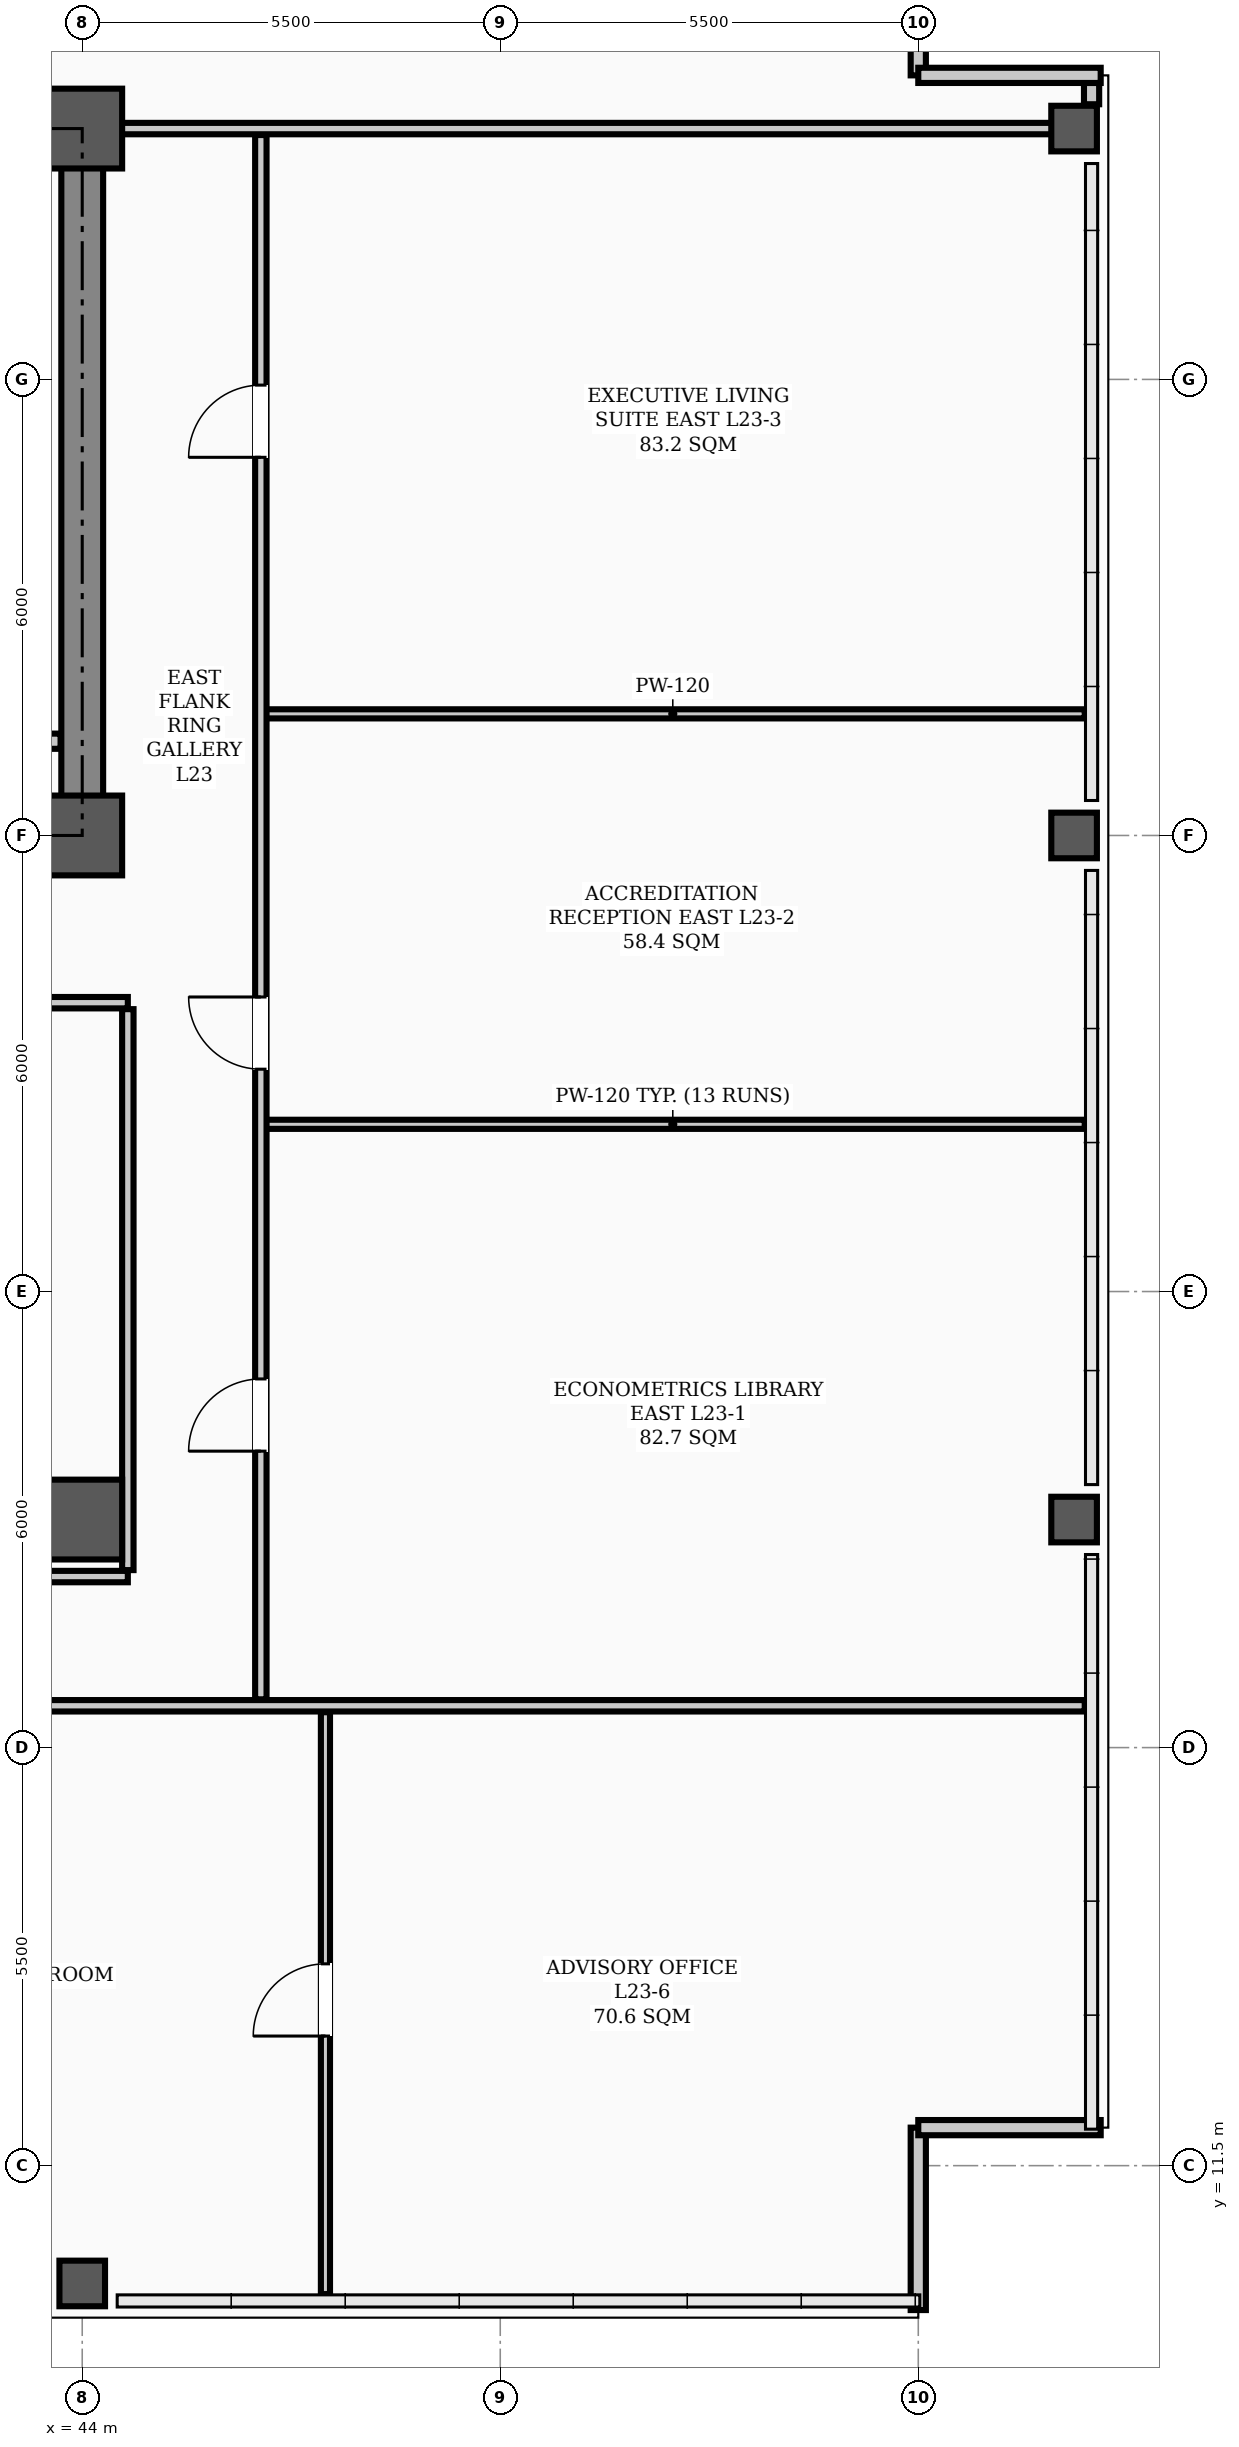
"""IFC4 building model, lengths in metres.
Left out: names, types, materials, properties, quantities, classifications, styles, units other than length and angle.
Written with IfcOpenShell. Run it as: python <this file> out.ifc"""

import sys

from ifc_helpers import new_model, si_unit, direction, frame, frame_2d, origin, origin_2d, place, context, subcontext, project, spatial, rectangle, hollow_rectangle, extrude, element, fill, save


model = new_model("IFC4")
c1 = context("Model", 3, precision=1e-05, world=origin(), true_north=direction((0.0, 1.0)))
c2 = subcontext(c1, "Body", "Model", "MODEL_VIEW")
j1 = project(units=[si_unit("LENGTHUNIT", "METRE"), si_unit("PLANEANGLEUNIT", "RADIAN")], contexts=[c1])
p1 = place(None, origin())
s1 = spatial("IfcSite", under=j1, at=p1, CompositionType="ELEMENT")
p2 = place(p1, origin())
s2 = spatial("IfcBuilding", under=s1, at=p2, CompositionType="ELEMENT")
p3 = place(p2, frame((0.0, 0.0, 92.8)))
s3 = spatial("IfcBuildingStorey", under=s2, at=p3, CompositionType="ELEMENT", Elevation=92.8)
for number, where, z_axis, x_axis in (
    (1, (44.0, 29.0, 0.0), (0.0, 0.0, 1.0), (1.0, 0.0, 0.0)),
    (2, (44.0, 38.3, 0.0), (0.0, 0.0, 1.0), (1.0, 0.0, 0.0)),
    (3, (44.0, 20.0, 0.0), (0.0, 0.0, 1.0), (1.0, 0.0, 0.0)),
):
    element("IfcColumn", number, at=place(p3, frame(where, z_axis=z_axis, x_axis=x_axis)), inside=s3, PredefinedType="COLUMN", context=c2, shape_type="SweptSolid", body=[
        extrude(hollow_rectangle(XDim=1.05, YDim=1.05, WallThickness=0.038, InnerFilletRadius=0.019, OuterFilletRadius=0.057, at=origin_2d()), origin(), (0.0, 0.0, 1.0), 3.9),
    ])
for number, where, z_axis, x_axis in (
    (4, (44.0, 9.95, 0.0), (0.0, 0.0, 1.0), (1.0, 0.0, 0.0)),
    (5, (57.05, 20.0, 0.0), (0.0, 0.0, 1.0), (1.0, 0.0, 0.0)),
    (6, (57.05, 29.0, 0.0), (0.0, 0.0, 1.0), (1.0, 0.0, 0.0)),
    (7, (57.05, 38.3, 0.0), (0.0, 0.0, 1.0), (1.0, 0.0, 0.0)),
):
    element("IfcColumn", number, at=place(p3, frame(where, z_axis=z_axis, x_axis=x_axis)), inside=s3, PredefinedType="COLUMN", context=c2, shape_type="SweptSolid", body=[
        extrude(hollow_rectangle(XDim=0.6, YDim=0.6, WallThickness=0.026, InnerFilletRadius=0.013, OuterFilletRadius=0.039, at=origin_2d()), origin(), (0.0, 0.0, 1.0), 3.9),
    ])
p4 = place(p3, frame((57.28, 38.62, 0.0), z_axis=(0.0, 0.0, 1.0), x_axis=(0.0, 1.0, 0.0)))
e8 = element("IfcWall", 8, at=p4, inside=s3, PredefinedType="PARAPET", context=c2, shape_type="SweptSolid", body=[
    extrude(rectangle(XDim=0.28, YDim=0.2, at=frame_2d((0.14, 0.0))), origin(), (0.0, 0.0, 1.0), 1.2),
])
for number, where, z_axis, x_axis in (
    (9, (55.0, 9.6, 0.0), (0.0, 0.0, 1.0), (0.0, 1.0, 0.0)),
    (10, (55.0, 12.0, 0.0), (0.0, 0.0, 1.0), (1.0, 0.0, 0.0)),
    (11, (55.0, 41.4, 0.0), (0.0, 0.0, 1.0), (0.0, -1.0, 0.0)),
    (12, (55.0, 39.0, 0.0), (0.0, 0.0, 1.0), (1.0, 0.0, 0.0)),
):
    element("IfcWall", number, at=place(p3, frame(where, z_axis=z_axis, x_axis=x_axis)), inside=s3, PredefinedType="PARAPET", context=c2, shape_type="SweptSolid", body=[
        extrude(rectangle(XDim=2.4, YDim=0.2, at=frame_2d((1.2, 0.0))), origin(), (0.0, 0.0, 1.0), 1.2),
    ])
p5 = place(p3, frame((13.5, 29.0, 0.0), z_axis=(0.0, 0.0, 1.0), x_axis=(1.0, 0.0, 0.0)))
e13 = element("IfcWall", 13, at=p5, inside=s3, PredefinedType="SHEAR", context=c2, shape_type="SweptSolid", body=[
    extrude(rectangle(XDim=30.5, YDim=0.55, at=frame_2d((15.25, 0.0))), origin(), (0.0, 0.0, 1.0), 3.72),
])
p6 = place(p5, frame((1.75, 0.0, 0.0)))
e14 = element("IfcOpeningElement", 14, at=p6, cuts=e13, PredefinedType="OPENING", context=c2, shape_type="SweptSolid", body=[
    extrude(rectangle(XDim=1.1, YDim=2.08, at=frame_2d((0.55, 1.04))), frame((0.0, 0.285, 0.0), z_axis=(0.0, -1.0, 0.0), x_axis=(1.0, 0.0, 0.0)), (0.0, 0.0, 1.0), 0.57),
])
p7 = place(p5, frame((26.7, 0.0, 0.0)))
e15 = element("IfcOpeningElement", 15, at=p7, cuts=e13, PredefinedType="OPENING", context=c2, shape_type="SweptSolid", body=[
    extrude(rectangle(XDim=1.1, YDim=2.08, at=frame_2d((0.55, 1.04))), frame((0.0, 0.285, 0.0), z_axis=(0.0, -1.0, 0.0), x_axis=(1.0, 0.0, 0.0)), (0.0, 0.0, 1.0), 0.57),
])
p8 = place(p5, frame((6.8, 0.0, 0.0)))
e16 = element("IfcOpeningElement", 16, at=p8, cuts=e13, PredefinedType="OPENING", context=c2, shape_type="SweptSolid", body=[
    extrude(rectangle(XDim=1.1, YDim=2.08, at=frame_2d((0.55, 1.04))), frame((0.0, 0.285, 0.0), z_axis=(0.0, -1.0, 0.0), x_axis=(1.0, 0.0, 0.0)), (0.0, 0.0, 1.0), 0.57),
])
p9 = place(p5, frame((13.2, 0.0, 0.0)))
e17 = element("IfcOpeningElement", 17, at=p9, cuts=e13, PredefinedType="OPENING", context=c2, shape_type="SweptSolid", body=[
    extrude(rectangle(XDim=1.6, YDim=2.08, at=frame_2d((0.8, 1.04))), frame((0.0, 0.285, 0.0), z_axis=(0.0, -1.0, 0.0), x_axis=(1.0, 0.0, 0.0)), (0.0, 0.0, 1.0), 0.57),
])
p10 = place(p5, frame((19.6, 0.0, 0.0)))
e18 = element("IfcOpeningElement", 18, at=p10, cuts=e13, PredefinedType="OPENING", context=c2, shape_type="SweptSolid", body=[
    extrude(rectangle(XDim=0.9, YDim=2.08, at=frame_2d((0.45, 1.04))), frame((0.0, 0.285, 0.0), z_axis=(0.0, -1.0, 0.0), x_axis=(1.0, 0.0, 0.0)), (0.0, 0.0, 1.0), 0.57),
])
p11 = place(p5, frame((21.6, 0.0, 0.0)))
e19 = element("IfcOpeningElement", 19, at=p11, cuts=e13, PredefinedType="OPENING", context=c2, shape_type="SweptSolid", body=[
    extrude(rectangle(XDim=0.9, YDim=2.08, at=frame_2d((0.45, 1.04))), frame((0.0, 0.285, 0.0), z_axis=(0.0, -1.0, 0.0), x_axis=(1.0, 0.0, 0.0)), (0.0, 0.0, 1.0), 0.57),
])
p12 = place(p3, frame((13.5, 38.3, 0.0), z_axis=(0.0, 0.0, 1.0), x_axis=(1.0, 0.0, 0.0)))
e20 = element("IfcWall", 20, at=p12, inside=s3, PredefinedType="SHEAR", context=c2, shape_type="SweptSolid", body=[
    extrude(rectangle(XDim=30.5, YDim=0.55, at=frame_2d((15.25, 0.0))), origin(), (0.0, 0.0, 1.0), 3.72),
])
p13 = place(p3, frame((44.0, 29.35, 0.0), z_axis=(0.0, 0.0, 1.0), x_axis=(0.0, 1.0, 0.0)))
e21 = element("IfcWall", 21, at=p13, inside=s3, PredefinedType="SHEAR", context=c2, shape_type="SweptSolid", body=[
    extrude(rectangle(XDim=8.6, YDim=0.55, at=frame_2d((4.3, 0.0))), origin(), (0.0, 0.0, 1.0), 3.72),
])
p14 = place(p3, frame((42.4, 30.24, 0.0), z_axis=(0.0, 0.0, 1.0), x_axis=(1.0, 0.0, 0.0)))
e22 = element("IfcWall", 22, at=p14, inside=s3, PredefinedType="STANDARD", context=c2, shape_type="SweptSolid", body=[
    extrude(rectangle(XDim=1.315, YDim=0.2, at=frame_2d((0.658, 0.0))), origin(), (0.0, 0.0, 1.0), 3.1),
])
p15 = place(p3, frame((12.9, 26.8, 0.0), z_axis=(0.0, 0.0, 1.0), x_axis=(1.0, 0.0, 0.0)))
e23 = element("IfcWall", 23, at=p15, inside=s3, PredefinedType="PARTITIONING", context=c2, shape_type="SweptSolid", body=[
    extrude(rectangle(XDim=31.7, YDim=0.15, at=frame_2d((15.85, 0.0))), origin(), (0.0, 0.0, 1.0), 3.1),
])
p16 = place(p15, frame((13.6, 0.0, 0.0)))
e24 = element("IfcOpeningElement", 24, at=p16, cuts=e23, PredefinedType="OPENING", context=c2, shape_type="SweptSolid", body=[
    extrude(rectangle(XDim=1.6, YDim=2.08, at=frame_2d((0.8, 1.04))), frame((0.0, 0.085, 0.0), z_axis=(0.0, -1.0, 0.0), x_axis=(1.0, 0.0, 0.0)), (0.0, 0.0, 1.0), 0.17),
])
p17 = place(p15, frame((2.075, 0.0, 0.0)))
e25 = element("IfcOpeningElement", 25, at=p17, cuts=e23, PredefinedType="OPENING", context=c2, shape_type="SweptSolid", body=[
    extrude(rectangle(XDim=0.95, YDim=2.08, at=frame_2d((0.475, 1.04))), frame((0.0, 0.085, 0.0), z_axis=(0.0, -1.0, 0.0), x_axis=(1.0, 0.0, 0.0)), (0.0, 0.0, 1.0), 0.17),
])
p18 = place(p15, frame((6.925, 0.0, 0.0)))
e26 = element("IfcOpeningElement", 26, at=p18, cuts=e23, PredefinedType="OPENING", context=c2, shape_type="SweptSolid", body=[
    extrude(rectangle(XDim=0.95, YDim=2.08, at=frame_2d((0.475, 1.04))), frame((0.0, 0.085, 0.0), z_axis=(0.0, -1.0, 0.0), x_axis=(1.0, 0.0, 0.0)), (0.0, 0.0, 1.0), 0.17),
])
p19 = place(p15, frame((11.025, 0.0, 0.0)))
e27 = element("IfcOpeningElement", 27, at=p19, cuts=e23, PredefinedType="OPENING", context=c2, shape_type="SweptSolid", body=[
    extrude(rectangle(XDim=0.95, YDim=2.08, at=frame_2d((0.475, 1.04))), frame((0.0, 0.085, 0.0), z_axis=(0.0, -1.0, 0.0), x_axis=(1.0, 0.0, 0.0)), (0.0, 0.0, 1.0), 0.17),
])
p20 = place(p15, frame((16.075, 0.0, 0.0)))
e28 = element("IfcOpeningElement", 28, at=p20, cuts=e23, PredefinedType="OPENING", context=c2, shape_type="SweptSolid", body=[
    extrude(rectangle(XDim=0.95, YDim=2.08, at=frame_2d((0.475, 1.04))), frame((0.0, 0.085, 0.0), z_axis=(0.0, -1.0, 0.0), x_axis=(1.0, 0.0, 0.0)), (0.0, 0.0, 1.0), 0.17),
])
p21 = place(p15, frame((22.025, 0.0, 0.0)))
e29 = element("IfcOpeningElement", 29, at=p21, cuts=e23, PredefinedType="OPENING", context=c2, shape_type="SweptSolid", body=[
    extrude(rectangle(XDim=0.95, YDim=2.08, at=frame_2d((0.475, 1.04))), frame((0.0, 0.085, 0.0), z_axis=(0.0, -1.0, 0.0), x_axis=(1.0, 0.0, 0.0)), (0.0, 0.0, 1.0), 0.17),
])
p22 = place(p15, frame((28.525, 0.0, 0.0)))
e30 = element("IfcOpeningElement", 30, at=p22, cuts=e23, PredefinedType="OPENING", context=c2, shape_type="SweptSolid", body=[
    extrude(rectangle(XDim=0.95, YDim=2.08, at=frame_2d((0.475, 1.04))), frame((0.0, 0.085, 0.0), z_axis=(0.0, -1.0, 0.0), x_axis=(1.0, 0.0, 0.0)), (0.0, 0.0, 1.0), 0.17),
])
p23 = place(p3, frame((7.81, 17.55, 0.0), z_axis=(0.0, 0.0, 1.0), x_axis=(1.0, 0.0, 0.0)))
e31 = element("IfcWall", 31, at=p23, inside=s3, PredefinedType="PARTITIONING", context=c2, shape_type="SweptSolid", body=[
    extrude(rectangle(XDim=49.38, YDim=0.15, at=frame_2d((24.69, 0.0))), origin(), (0.0, 0.0, 1.0), 3.1),
])
p24 = place(p23, frame((3.59, 0.0, 0.0)))
e32 = element("IfcOpeningElement", 32, at=p24, cuts=e31, PredefinedType="OPENING", context=c2, shape_type="SweptSolid", body=[
    extrude(rectangle(XDim=0.95, YDim=2.08, at=frame_2d((0.475, 1.04))), frame((0.0, 0.085, 0.0), z_axis=(0.0, -1.0, 0.0), x_axis=(1.0, 0.0, 0.0)), (0.0, 0.0, 1.0), 0.17),
])
p25 = place(p23, frame((10.115, 0.0, 0.0)))
e33 = element("IfcOpeningElement", 33, at=p25, cuts=e31, PredefinedType="OPENING", context=c2, shape_type="SweptSolid", body=[
    extrude(rectangle(XDim=0.95, YDim=2.08, at=frame_2d((0.475, 1.04))), frame((0.0, 0.085, 0.0), z_axis=(0.0, -1.0, 0.0), x_axis=(1.0, 0.0, 0.0)), (0.0, 0.0, 1.0), 0.17),
])
p26 = place(p23, frame((18.615, 0.0, 0.0)))
e34 = element("IfcOpeningElement", 34, at=p26, cuts=e31, PredefinedType="OPENING", context=c2, shape_type="SweptSolid", body=[
    extrude(rectangle(XDim=0.95, YDim=2.08, at=frame_2d((0.475, 1.04))), frame((0.0, 0.085, 0.0), z_axis=(0.0, -1.0, 0.0), x_axis=(1.0, 0.0, 0.0)), (0.0, 0.0, 1.0), 0.17),
])
p27 = place(p23, frame((27.315, 0.0, 0.0)))
e35 = element("IfcOpeningElement", 35, at=p27, cuts=e31, PredefinedType="OPENING", context=c2, shape_type="SweptSolid", body=[
    extrude(rectangle(XDim=0.95, YDim=2.08, at=frame_2d((0.475, 1.04))), frame((0.0, 0.085, 0.0), z_axis=(0.0, -1.0, 0.0), x_axis=(1.0, 0.0, 0.0)), (0.0, 0.0, 1.0), 0.17),
])
p28 = place(p23, frame((33.89, 0.0, 0.0)))
e36 = element("IfcOpeningElement", 36, at=p28, cuts=e31, PredefinedType="OPENING", context=c2, shape_type="SweptSolid", body=[
    extrude(rectangle(XDim=0.95, YDim=2.08, at=frame_2d((0.475, 1.04))), frame((0.0, 0.085, 0.0), z_axis=(0.0, -1.0, 0.0), x_axis=(1.0, 0.0, 0.0)), (0.0, 0.0, 1.0), 0.17),
])
p29 = place(p3, frame((28.4, 19.25, 0.0), z_axis=(0.0, 0.0, 1.0), x_axis=(1.0, 0.0, 0.0)))
e37 = element("IfcWall", 37, at=p29, inside=s3, PredefinedType="PARTITIONING", context=c2, shape_type="SweptSolid", body=[
    extrude(rectangle(XDim=16.2, YDim=0.15, at=frame_2d((8.1, 0.0))), origin(), (0.0, 0.0, 1.0), 3.1),
])
p30 = place(p3, frame((44.0, 38.3, 0.0), z_axis=(0.0, 0.0, 1.0), x_axis=(1.0, 0.0, 0.0)))
e38 = element("IfcWall", 38, at=p30, inside=s3, PredefinedType="PARTITIONING", context=c2, shape_type="SweptSolid", body=[
    extrude(rectangle(XDim=13.19, YDim=0.15, at=frame_2d((6.595, 0.0))), origin(), (0.0, 0.0, 1.0), 3.0),
])
for number, where, z_axis, x_axis in (
    (39, (46.35, 25.2, 0.0), (0.0, 0.0, 1.0), (1.0, 0.0, 0.0)),
    (40, (46.35, 30.6, 0.0), (0.0, 0.0, 1.0), (1.0, 0.0, 0.0)),
):
    element("IfcWall", number, at=place(p3, frame(where, z_axis=z_axis, x_axis=x_axis)), inside=s3, PredefinedType="PARTITIONING", context=c2, shape_type="SweptSolid", body=[
        extrude(rectangle(XDim=10.84, YDim=0.12, at=frame_2d((5.42, 0.0))), origin(), (0.0, 0.0, 1.0), 3.212),
    ])
p31 = place(p3, frame((46.35, 17.635, 0.0), z_axis=(0.0, 0.0, 1.0), x_axis=(0.0, 1.0, 0.0)))
e41 = element("IfcWall", 41, at=p31, inside=s3, PredefinedType="PARTITIONING", context=c2, shape_type="SweptSolid", body=[
    extrude(rectangle(XDim=20.58, YDim=0.15, at=frame_2d((10.29, 0.0))), origin(), (0.0, 0.0, 1.0), 3.0),
])
p32 = place(p31, frame((3.265, 0.0, 0.0)))
e42 = element("IfcOpeningElement", 42, at=p32, cuts=e41, PredefinedType="OPENING", context=c2, shape_type="SweptSolid", body=[
    extrude(rectangle(XDim=0.95, YDim=2.08, at=frame_2d((0.475, 1.04))), frame((0.0, 0.085, 0.0), z_axis=(0.0, -1.0, 0.0), x_axis=(1.0, 0.0, 0.0)), (0.0, 0.0, 1.0), 0.17),
])
p33 = place(p31, frame((8.29, 0.0, 0.0)))
e43 = element("IfcOpeningElement", 43, at=p33, cuts=e41, PredefinedType="OPENING", context=c2, shape_type="SweptSolid", body=[
    extrude(rectangle(XDim=0.95, YDim=2.08, at=frame_2d((0.475, 1.04))), frame((0.0, 0.085, 0.0), z_axis=(0.0, -1.0, 0.0), x_axis=(1.0, 0.0, 0.0)), (0.0, 0.0, 1.0), 0.17),
])
p34 = place(p31, frame((16.34, 0.0, 0.0)))
e44 = element("IfcOpeningElement", 44, at=p34, cuts=e41, PredefinedType="OPENING", context=c2, shape_type="SweptSolid", body=[
    extrude(rectangle(XDim=0.95, YDim=2.08, at=frame_2d((0.475, 1.04))), frame((0.0, 0.085, 0.0), z_axis=(0.0, -1.0, 0.0), x_axis=(1.0, 0.0, 0.0)), (0.0, 0.0, 1.0), 0.17),
])
p35 = place(p3, frame((44.6, 19.335, 0.0), z_axis=(0.0, 0.0, 1.0), x_axis=(0.0, 1.0, 0.0)))
e45 = element("IfcWall", 45, at=p35, inside=s3, PredefinedType="PARTITIONING", context=c2, shape_type="SweptSolid", body=[
    extrude(rectangle(XDim=7.38, YDim=0.15, at=frame_2d((3.69, 0.0))), origin(), (0.0, 0.0, 1.0), 3.0),
])
p36 = place(p3, frame((47.2, 9.81, 0.0), z_axis=(0.0, 0.0, 1.0), x_axis=(0.0, 1.0, 0.0)))
e46 = element("IfcWall", 46, at=p36, inside=s3, PredefinedType="PARTITIONING", context=c2, shape_type="SweptSolid", body=[
    extrude(rectangle(XDim=7.655, YDim=0.12, at=frame_2d((3.828, 0.0))), origin(), (0.0, 0.0, 1.0), 3.72),
])
p37 = place(p36, frame((3.395, 0.0, 0.0)))
e47 = element("IfcOpeningElement", 47, at=p37, cuts=e46, PredefinedType="OPENING", context=c2, shape_type="SweptSolid", body=[
    extrude(rectangle(XDim=0.95, YDim=2.08, at=frame_2d((0.475, 1.04))), frame((0.0, 0.07, 0.0), z_axis=(0.0, -1.0, 0.0), x_axis=(1.0, 0.0, 0.0)), (0.0, 0.0, 1.0), 0.14),
])
p38 = place(p37, origin())
e48 = element("IfcDoor", 48, at=p38, inside=s3, OperationType="SINGLE_SWING_LEFT", PredefinedType="DOOR", context=c2, shape_type="SweptSolid", body=[
    extrude(rectangle(XDim=0.95, YDim=2.08, at=frame_2d((0.475, 1.04))), frame((0.0, 0.025, 0.0), z_axis=(0.0, -1.0, 0.0), x_axis=(1.0, 0.0, 0.0)), (0.0, 0.0, 1.0), 0.05),
])
fill(e47, e48)
p39 = place(p32, origin())
e49 = element("IfcDoor", 49, at=p39, inside=s3, OperationType="SINGLE_SWING_LEFT", PredefinedType="DOOR", context=c2, shape_type="SweptSolid", body=[
    extrude(rectangle(XDim=0.95, YDim=2.08, at=frame_2d((0.475, 1.04))), frame((0.0, 0.025, 0.0), z_axis=(0.0, -1.0, 0.0), x_axis=(1.0, 0.0, 0.0)), (0.0, 0.0, 1.0), 0.05),
])
fill(e42, e49)
p40 = place(p33, origin())
e50 = element("IfcDoor", 50, at=p40, inside=s3, OperationType="SINGLE_SWING_RIGHT", PredefinedType="DOOR", context=c2, shape_type="SweptSolid", body=[
    extrude(rectangle(XDim=0.95, YDim=2.08, at=frame_2d((0.475, 1.04))), frame((0.0, 0.025, 0.0), z_axis=(0.0, -1.0, 0.0), x_axis=(1.0, 0.0, 0.0)), (0.0, 0.0, 1.0), 0.05),
])
fill(e43, e50)
p41 = place(p34, origin())
e51 = element("IfcDoor", 51, at=p41, inside=s3, OperationType="SINGLE_SWING_LEFT", PredefinedType="DOOR", context=c2, shape_type="SweptSolid", body=[
    extrude(rectangle(XDim=0.95, YDim=2.08, at=frame_2d((0.475, 1.04))), frame((0.0, 0.025, 0.0), z_axis=(0.0, -1.0, 0.0), x_axis=(1.0, 0.0, 0.0)), (0.0, 0.0, 1.0), 0.05),
])
fill(e44, e51)
save(model, sys.argv[1])
